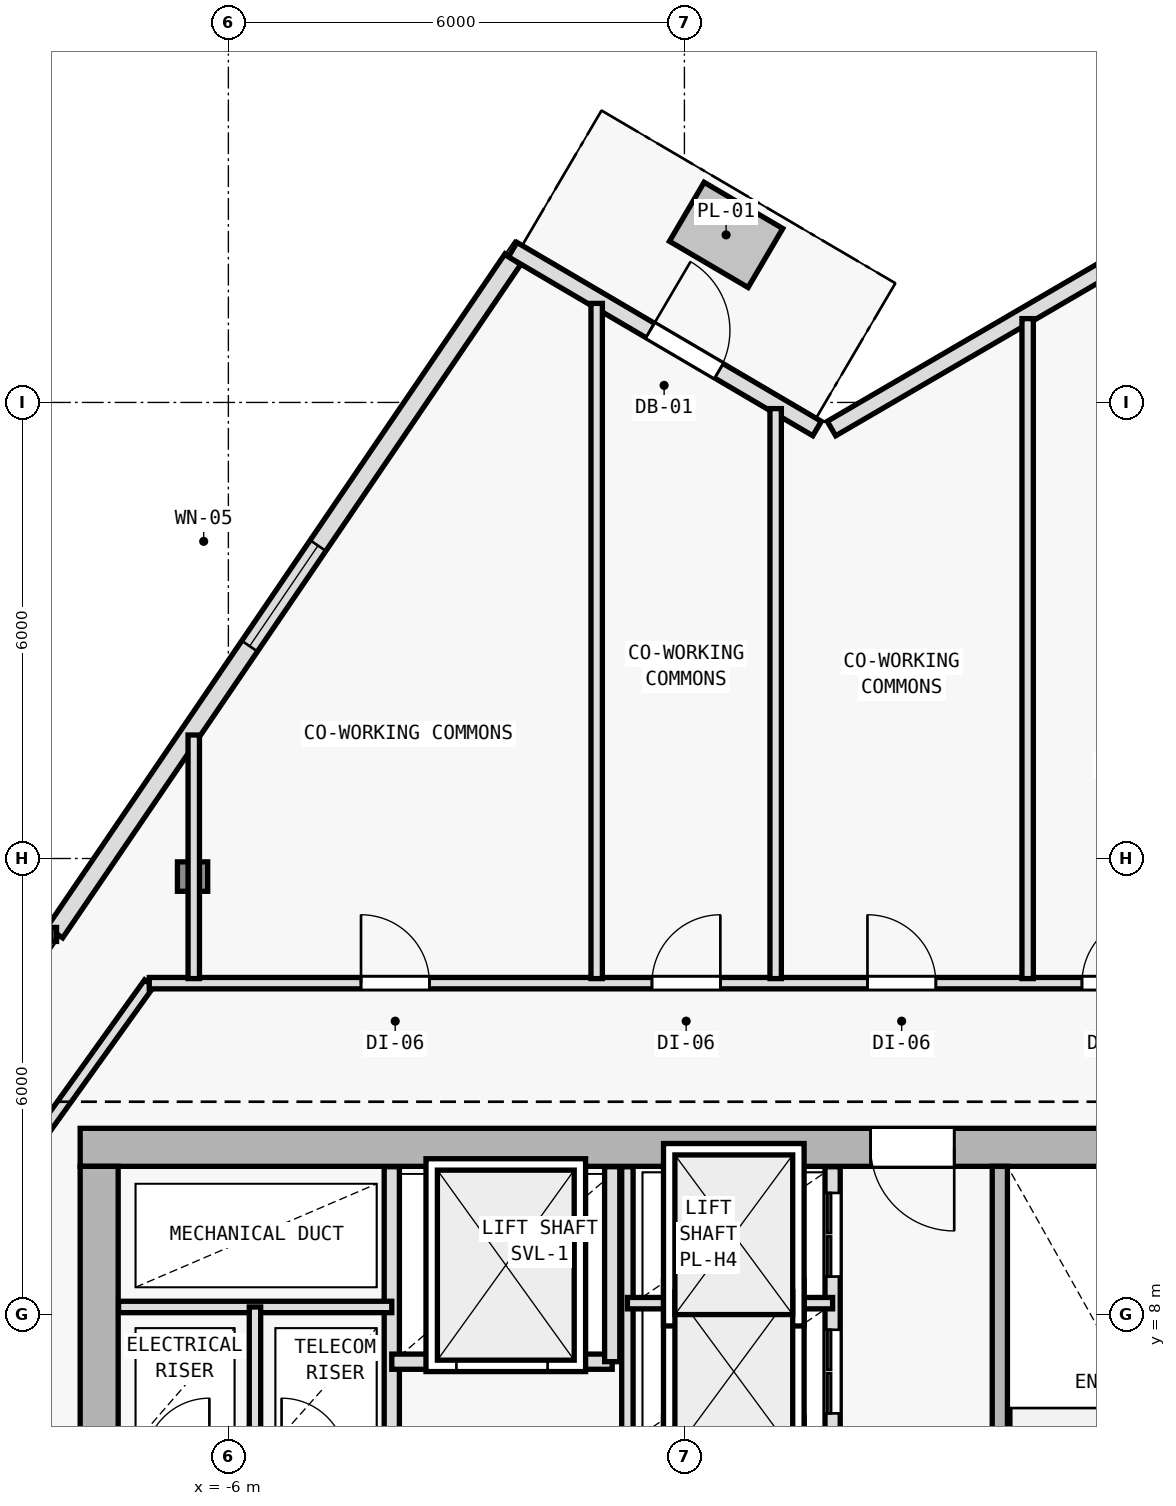
"""IFC4 building model, lengths in metres.
Left out: names, types, materials, properties, quantities, classifications, styles, units other than length and angle.
Written with IfcOpenShell. Run it as: python <this file> out.ifc"""

import sys

from ifc_helpers import new_model, si_unit, direction, frame, frame_2d, origin, origin_2d, place, context, subcontext, project, spatial, rectangle, i_section, extrude, element, fill, save


model = new_model("IFC4")
c1 = context("Model", 3, precision=1e-05, world=origin(), true_north=direction((0.0, 1.0)))
c2 = subcontext(c1, "Body", "Model", "MODEL_VIEW")
j1 = project(units=[si_unit("LENGTHUNIT", "METRE"), si_unit("PLANEANGLEUNIT", "RADIAN")], contexts=[c1])
p1 = place(None, origin())
s1 = spatial("IfcSite", under=j1, at=p1, CompositionType="ELEMENT")
p2 = place(p1, origin())
s2 = spatial("IfcBuilding", under=s1, at=p2, CompositionType="ELEMENT")
p3 = place(p2, frame((0.0, 0.0, 205.5)))
s3 = spatial("IfcBuildingStorey", under=s2, at=p3, CompositionType="ELEMENT", Elevation=205.5)
p4 = place(p3, frame((-7.7, 10.2, 0.0), z_axis=(0.0, 0.0, 1.0), x_axis=(1.0, 0.0, 0.0)))
e1 = element("IfcColumn", 1, at=p4, inside=s3, PredefinedType="COLUMN", context=c2, shape_type="SweptSolid", body=[
    extrude(i_section(OverallWidth=0.398, OverallDepth=0.387, WebThickness=0.013, FlangeThickness=0.022, FilletRadius=0.015, at=origin_2d()), origin(), (0.0, 0.0, 1.0), 3.6),
])
p5 = place(p3, frame((-6.471, 13.762, 0.006), z_axis=(0.008775143007, -0.002584925847, 0.999958156636), x_axis=(0.282568886397, 0.959247009086, 0.0)))
e2 = element("IfcColumn", 2, at=p5, inside=s3, PredefinedType="COLUMN", context=c2, shape_type="SweptSolid", body=[
    extrude(i_section(OverallWidth=0.398, OverallDepth=0.387, WebThickness=0.013, FlangeThickness=0.022, FilletRadius=0.015, at=origin_2d()), origin(), (0.0, 0.0, 1.0), 3.589),
])
p6 = place(p3, frame((-8.284, 13.026, 0.0), z_axis=(0.0, 0.0, 1.0), x_axis=(0.562468945091, 0.826818411629, 0.0)))
e3 = element("IfcWall", 3, at=p6, inside=s3, PredefinedType="SOLIDWALL", context=c2, shape_type="SweptSolid", body=[
    extrude(rectangle(XDim=10.714, YDim=0.25, at=frame_2d((5.357, 0.0))), origin(), (0.0, 0.0, 1.0), 3.35),
])
p7 = place(p6, frame((4.557, 0.0, 0.62)))
e4 = element("IfcOpeningElement", 4, at=p7, cuts=e3, PredefinedType="OPENING", context=c2, shape_type="SweptSolid", body=[
    extrude(rectangle(XDim=1.6, YDim=2.1, at=frame_2d((0.8, 1.05))), frame((0.0, 0.135, 0.0), z_axis=(0.0, -1.0, 0.0), x_axis=(1.0, 0.0, 0.0)), (0.0, 0.0, 1.0), 0.27),
])
p8 = place(p3, frame((1.935, 19.656, 0.0), z_axis=(0.0, 0.0, 1.0), x_axis=(0.863987356641, 0.503513502862, 0.0)))
e5 = element("IfcWall", 5, at=p8, inside=s3, PredefinedType="SOLIDWALL", context=c2, shape_type="SweptSolid", body=[
    extrude(rectangle(XDim=4.204, YDim=0.22, at=frame_2d((2.102, 0.0))), origin(), (0.0, 0.0, 1.0), 3.35),
])
p9 = place(p3, frame((-2.259, 22.01, 0.0), z_axis=(0.0, 0.0, 1.0), x_axis=(0.862123324624, -0.506698503193, 0.0)))
e6 = element("IfcWall", 6, at=p9, inside=s3, PredefinedType="SOLIDWALL", context=c2, shape_type="SweptSolid", body=[
    extrude(rectangle(XDim=4.645, YDim=0.22, at=frame_2d((2.322, 0.0))), origin(), (0.0, 0.0, 1.0), 3.35),
])
p10 = place(p9, frame((2.097, 0.0, 0.0)))
e7 = element("IfcOpeningElement", 7, at=p10, cuts=e6, PredefinedType="OPENING", context=c2, shape_type="SweptSolid", body=[
    extrude(rectangle(XDim=1.05, YDim=2.15, at=frame_2d((0.525, 1.075))), frame((0.0, 0.12, 0.0), z_axis=(0.0, -1.0, 0.0), x_axis=(1.0, 0.0, 0.0)), (0.0, 0.0, 1.0), 0.24),
])
p11 = place(p3, frame((7.95, 10.2, 0.0), z_axis=(0.0, 0.0, 1.0), x_axis=(-1.0, 0.0, 0.0)))
e8 = element("IfcWall", 8, at=p11, inside=s3, PredefinedType="SHEAR", context=c2, shape_type="SweptSolid", body=[
    extrude(rectangle(XDim=15.9, YDim=0.5, at=frame_2d((7.95, 0.0))), origin(), (0.0, 0.0, 1.0), 3.35),
])
p12 = place(p11, frame((4.4, 0.0, 0.0)))
e9 = element("IfcOpeningElement", 9, at=p12, cuts=e8, PredefinedType="OPENING", context=c2, shape_type="SweptSolid", body=[
    extrude(rectangle(XDim=1.1, YDim=2.15, at=frame_2d((0.55, 1.075))), frame((0.0, 0.26, 0.0), z_axis=(0.0, -1.0, 0.0), x_axis=(1.0, 0.0, 0.0)), (0.0, 0.0, 1.0), 0.52),
])
p13 = place(p3, frame((-7.7, -9.15, 0.0), z_axis=(0.0, 0.0, 1.0), x_axis=(0.0, 1.0, 0.0)))
e10 = element("IfcWall", 10, at=p13, inside=s3, PredefinedType="SHEAR", context=c2, shape_type="SweptSolid", body=[
    extrude(rectangle(XDim=19.1, YDim=0.5, at=frame_2d((9.55, 0.0))), origin(), (0.0, 0.0, 1.0), 3.35),
])
p14 = place(p13, frame((12.7, 0.0, 0.0)))
e11 = element("IfcOpeningElement", 11, at=p14, cuts=e10, PredefinedType="OPENING", context=c2, shape_type="SweptSolid", body=[
    extrude(rectangle(XDim=1.1, YDim=2.15, at=frame_2d((0.55, 1.075))), frame((0.0, 0.26, 0.0), z_axis=(0.0, -1.0, 0.0), x_axis=(1.0, 0.0, 0.0)), (0.0, 0.0, 1.0), 0.52),
])
p15 = place(p3, frame((-3.85, 1.35, 0.0), z_axis=(0.0, 0.0, 1.0), x_axis=(0.0, 1.0, 0.0)))
e12 = element("IfcWall", 12, at=p15, inside=s3, PredefinedType="SOLIDWALL", context=c2, shape_type="SweptSolid", body=[
    extrude(rectangle(XDim=8.595, YDim=0.2, at=frame_2d((4.297, 0.0))), origin(), (0.0, 0.0, 1.0), 3.35),
])
p16 = place(p15, frame((1.5, 0.0, 0.0)))
e13 = element("IfcOpeningElement", 13, at=p16, cuts=e12, PredefinedType="OPENING", context=c2, shape_type="SweptSolid", body=[
    extrude(rectangle(XDim=1.0, YDim=2.15, at=frame_2d((0.5, 1.075))), frame((0.0, 0.11, 0.0), z_axis=(0.0, -1.0, 0.0), x_axis=(1.0, 0.0, 0.0)), (0.0, 0.0, 1.0), 0.22),
])
p17 = place(p15, frame((3.18, 0.0, 0.0)))
e14 = element("IfcOpeningElement", 14, at=p17, cuts=e12, PredefinedType="OPENING", context=c2, shape_type="SweptSolid", body=[
    extrude(rectangle(XDim=1.0, YDim=2.15, at=frame_2d((0.5, 1.075))), frame((0.0, 0.11, 0.0), z_axis=(0.0, -1.0, 0.0), x_axis=(1.0, 0.0, 0.0)), (0.0, 0.0, 1.0), 0.22),
])
p18 = place(p3, frame((-7.445, 8.1, 0.0), z_axis=(0.0, 0.0, 1.0), x_axis=(1.0, 0.0, 0.0)))
e15 = element("IfcWall", 15, at=p18, inside=s3, PredefinedType="PARTITIONING", context=c2, shape_type="SweptSolid", body=[
    extrude(rectangle(XDim=3.595, YDim=0.15, at=frame_2d((1.797, 0.0))), origin(), (0.0, 0.0, 1.0), 3.35),
])
p19 = place(p3, frame((-5.65, 6.05, 0.0), z_axis=(0.0, 0.0, 1.0), x_axis=(0.0, 1.0, 0.0)))
e16 = element("IfcWall", 16, at=p19, inside=s3, PredefinedType="PARTITIONING", context=c2, shape_type="SweptSolid", body=[
    extrude(rectangle(XDim=2.05, YDim=0.15, at=frame_2d((1.025, 0.0))), origin(), (0.0, 0.0, 1.0), 3.35),
])
p20 = place(p3, frame((4.15, 2.75, 0.0), z_axis=(0.0, 0.0, 1.0), x_axis=(0.0, 1.0, 0.0)))
e17 = element("IfcWall", 17, at=p20, inside=s3, PredefinedType="SOLIDWALL", context=c2, shape_type="SweptSolid", body=[
    extrude(rectangle(XDim=7.2, YDim=0.2, at=frame_2d((3.6, 0.0))), origin(), (0.0, 0.0, 1.0), 3.35),
])
p21 = place(p20, frame((0.35, 0.0, 0.0)))
e18 = element("IfcOpeningElement", 18, at=p21, cuts=e17, PredefinedType="OPENING", context=c2, shape_type="SweptSolid", body=[
    extrude(rectangle(XDim=1.0, YDim=2.15, at=frame_2d((0.5, 1.075))), frame((0.0, 0.11, 0.0), z_axis=(0.0, -1.0, 0.0), x_axis=(1.0, 0.0, 0.0)), (0.0, 0.0, 1.0), 0.22),
])
p22 = place(p3, frame((-3.85, 7.38, 0.0), z_axis=(0.0, 0.0, 1.0), x_axis=(1.0, 0.0, 0.0)))
e19 = element("IfcWall", 19, at=p22, inside=s3, PredefinedType="SOLIDWALL", context=c2, shape_type="SweptSolid", body=[
    extrude(rectangle(XDim=2.9, YDim=0.2, at=frame_2d((1.45, 0.0))), origin(), (0.0, 0.0, 1.0), 3.35),
])
p23 = place(p22, frame((0.85, 0.0, 0.0)))
e20 = element("IfcOpeningElement", 20, at=p23, cuts=e19, PredefinedType="OPENING", context=c2, shape_type="SweptSolid", body=[
    extrude(rectangle(XDim=1.2, YDim=2.2, at=frame_2d((0.6, 1.1))), frame((0.0, 0.11, 0.0), z_axis=(0.0, -1.0, 0.0), x_axis=(1.0, 0.0, 0.0)), (0.0, 0.0, 1.0), 0.22),
])
p24 = place(p3, frame((-0.95, 7.38, 0.0), z_axis=(0.0, 0.0, 1.0), x_axis=(0.0, 1.0, 0.0)))
e21 = element("IfcWall", 21, at=p24, inside=s3, PredefinedType="SOLIDWALL", context=c2, shape_type="SweptSolid", body=[
    extrude(rectangle(XDim=2.565, YDim=0.2, at=frame_2d((1.283, 0.0))), origin(), (0.0, 0.0, 1.0), 3.35),
])
p25 = place(p3, frame((1.95, 2.65, 0.0), z_axis=(0.0, 0.0, 1.0), x_axis=(0.0, 1.0, 0.0)))
e22 = element("IfcWall", 22, at=p25, inside=s3, PredefinedType="SOLIDWALL", context=c2, shape_type="SweptSolid", body=[
    extrude(rectangle(XDim=7.295, YDim=0.2, at=frame_2d((3.647, 0.0))), origin(), (0.0, 0.0, 1.0), 3.35),
])
p26 = place(p25, frame((0.45, 0.0, 0.0)))
e23 = element("IfcOpeningElement", 23, at=p26, cuts=e22, PredefinedType="OPENING", context=c2, shape_type="SweptSolid", body=[
    extrude(rectangle(XDim=1.1, YDim=2.15, at=frame_2d((0.55, 1.075))), frame((0.0, 0.11, 0.0), z_axis=(0.0, -1.0, 0.0), x_axis=(1.0, 0.0, 0.0)), (0.0, 0.0, 1.0), 0.22),
])
p27 = place(p25, frame((2.25, 0.0, 0.0)))
e24 = element("IfcOpeningElement", 24, at=p27, cuts=e22, PredefinedType="OPENING", context=c2, shape_type="SweptSolid", body=[
    extrude(rectangle(XDim=1.1, YDim=2.15, at=frame_2d((0.55, 1.075))), frame((0.0, 0.11, 0.0), z_axis=(0.0, -1.0, 0.0), x_axis=(1.0, 0.0, 0.0)), (0.0, 0.0, 1.0), 0.22),
])
p28 = place(p25, frame((4.05, 0.0, 0.0)))
e25 = element("IfcOpeningElement", 25, at=p28, cuts=e22, PredefinedType="OPENING", context=c2, shape_type="SweptSolid", body=[
    extrude(rectangle(XDim=1.1, YDim=2.15, at=frame_2d((0.55, 1.075))), frame((0.0, 0.11, 0.0), z_axis=(0.0, -1.0, 0.0), x_axis=(1.0, 0.0, 0.0)), (0.0, 0.0, 1.0), 0.22),
])
p29 = place(p25, frame((5.85, 0.0, 0.0)))
e26 = element("IfcOpeningElement", 26, at=p29, cuts=e22, PredefinedType="OPENING", context=c2, shape_type="SweptSolid", body=[
    extrude(rectangle(XDim=1.1, YDim=2.15, at=frame_2d((0.55, 1.075))), frame((0.0, 0.11, 0.0), z_axis=(0.0, -1.0, 0.0), x_axis=(1.0, 0.0, 0.0)), (0.0, 0.0, 1.0), 0.22),
])
p30 = place(p3, frame((-0.75, 5.92, 0.0), z_axis=(0.0, 0.0, 1.0), x_axis=(0.0, 1.0, 0.0)))
e27 = element("IfcWall", 27, at=p30, inside=s3, PredefinedType="PARTITIONING", context=c2, shape_type="SweptSolid", body=[
    extrude(rectangle(XDim=4.025, YDim=0.15, at=frame_2d((2.013, 0.0))), origin(), (0.0, 0.0, 1.0), 3.35),
])
p31 = place(p3, frame((-0.75, 8.15, 0.0), z_axis=(0.0, 0.0, 1.0), x_axis=(1.0, 0.0, 0.0)))
e28 = element("IfcWall", 28, at=p31, inside=s3, PredefinedType="PARTITIONING", context=c2, shape_type="SweptSolid", body=[
    extrude(rectangle(XDim=2.7, YDim=0.15, at=frame_2d((1.35, 0.0))), origin(), (0.0, 0.0, 1.0), 3.35),
])
p32 = place(p3, frame((-9.86, 8.426, 0.0), z_axis=(0.0, 0.0, 1.0), x_axis=(0.582449511476, 0.812866881218, 0.0)))
e29 = element("IfcWall", 29, at=p32, inside=s3, PredefinedType="PARTITIONING", context=c2, shape_type="SweptSolid", body=[
    extrude(rectangle(XDim=4.84, YDim=0.15, at=frame_2d((2.42, 0.0))), origin(), (0.0, 0.0, 1.0), 2.975),
])
p33 = place(p3, frame((-7.041, 12.36, 0.0), z_axis=(0.0, 0.0, 1.0), x_axis=(1.0, 0.0, 0.0)))
e30 = element("IfcWall", 30, at=p33, inside=s3, PredefinedType="PARTITIONING", context=c2, shape_type="SweptSolid", body=[
    extrude(rectangle(XDim=14.064, YDim=0.15, at=frame_2d((7.032, 0.0))), origin(), (0.0, 0.0, 1.0), 2.975),
])
p34 = place(p33, frame((12.272, 0.0, 0.0)))
e31 = element("IfcOpeningElement", 31, at=p34, cuts=e30, PredefinedType="OPENING", context=c2, shape_type="SweptSolid", body=[
    extrude(rectangle(XDim=0.9, YDim=2.1, at=frame_2d((0.45, 1.05))), frame((0.0, 0.085, 0.0), z_axis=(0.0, -1.0, 0.0), x_axis=(1.0, 0.0, 0.0)), (0.0, 0.0, 1.0), 0.17),
])
p35 = place(p33, frame((9.449, 0.0, 0.0)))
e32 = element("IfcOpeningElement", 32, at=p35, cuts=e30, PredefinedType="OPENING", context=c2, shape_type="SweptSolid", body=[
    extrude(rectangle(XDim=0.9, YDim=2.1, at=frame_2d((0.45, 1.05))), frame((0.0, 0.085, 0.0), z_axis=(0.0, -1.0, 0.0), x_axis=(1.0, 0.0, 0.0)), (0.0, 0.0, 1.0), 0.17),
])
p36 = place(p33, frame((6.614, 0.0, 0.0)))
e33 = element("IfcOpeningElement", 33, at=p36, cuts=e30, PredefinedType="OPENING", context=c2, shape_type="SweptSolid", body=[
    extrude(rectangle(XDim=0.9, YDim=2.1, at=frame_2d((0.45, 1.05))), frame((0.0, 0.085, 0.0), z_axis=(0.0, -1.0, 0.0), x_axis=(1.0, 0.0, 0.0)), (0.0, 0.0, 1.0), 0.17),
])
p37 = place(p33, frame((2.786, 0.0, 0.0)))
e34 = element("IfcOpeningElement", 34, at=p37, cuts=e30, PredefinedType="OPENING", context=c2, shape_type="SweptSolid", body=[
    extrude(rectangle(XDim=0.9, YDim=2.1, at=frame_2d((0.45, 1.05))), frame((0.0, 0.085, 0.0), z_axis=(0.0, -1.0, 0.0), x_axis=(1.0, 0.0, 0.0)), (0.0, 0.0, 1.0), 0.17),
])
p38 = place(p3, frame((-6.456, 12.42, 0.0), z_axis=(0.0, 0.0, 1.0), x_axis=(0.0, 1.0, 0.0)))
e35 = element("IfcWall", 35, at=p38, inside=s3, PredefinedType="PARTITIONING", context=c2, shape_type="SweptSolid", body=[
    extrude(rectangle(XDim=3.205, YDim=0.15, at=frame_2d((1.602, 0.0))), origin(), (0.0, 0.0, 1.0), 2.975),
])
p39 = place(p3, frame((1.2, 12.42, 0.0), z_axis=(0.0, 0.0, 1.0), x_axis=(0.0, 1.0, 0.0)))
e36 = element("IfcWall", 36, at=p39, inside=s3, PredefinedType="PARTITIONING", context=c2, shape_type="SweptSolid", body=[
    extrude(rectangle(XDim=7.499, YDim=0.15, at=frame_2d((3.75, 0.0))), origin(), (0.0, 0.0, 1.0), 2.975),
])
p40 = place(p3, frame((4.516, 12.42, 0.0), z_axis=(0.0, 0.0, 1.0), x_axis=(0.0, 1.0, 0.0)))
e37 = element("IfcWall", 37, at=p40, inside=s3, PredefinedType="PARTITIONING", context=c2, shape_type="SweptSolid", body=[
    extrude(rectangle(XDim=8.683, YDim=0.15, at=frame_2d((4.341, 0.0))), origin(), (0.0, 0.0, 1.0), 2.975),
])
p41 = place(p3, frame((-1.154, 12.42, 0.0), z_axis=(0.0, 0.0, 1.0), x_axis=(0.0, 1.0, 0.0)))
e38 = element("IfcWall", 38, at=p41, inside=s3, PredefinedType="PARTITIONING", context=c2, shape_type="SweptSolid", body=[
    extrude(rectangle(XDim=8.883, YDim=0.15, at=frame_2d((4.441, 0.0))), origin(), (0.0, 0.0, 1.0), 2.975),
])
p42 = place(p7, origin())
e39 = element("IfcWindow", 39, at=p42, inside=s3, PartitioningType="SINGLE_PANEL", PredefinedType="WINDOW", context=c2, shape_type="SweptSolid", body=[
    extrude(rectangle(XDim=1.6, YDim=2.1, at=frame_2d((0.8, 1.05))), frame((0.0, 0.03, 0.0), z_axis=(0.0, -1.0, 0.0), x_axis=(1.0, 0.0, 0.0)), (0.0, 0.0, 1.0), 0.06),
])
fill(e4, e39)
p43 = place(p10, origin())
e40 = element("IfcDoor", 40, at=p43, inside=s3, OperationType="SINGLE_SWING_LEFT", PredefinedType="DOOR", context=c2, shape_type="SweptSolid", body=[
    extrude(rectangle(XDim=1.05, YDim=2.15, at=frame_2d((0.525, 1.075))), frame((0.0, 0.025, 0.0), z_axis=(0.0, -1.0, 0.0), x_axis=(1.0, 0.0, 0.0)), (0.0, 0.0, 1.0), 0.05),
])
fill(e7, e40)
p44 = place(p12, origin())
e41 = element("IfcDoor", 41, at=p44, inside=s3, OperationType="SINGLE_SWING_LEFT", PredefinedType="DOOR", context=c2, shape_type="SweptSolid", body=[
    extrude(rectangle(XDim=1.1, YDim=2.15, at=frame_2d((0.55, 1.075))), frame((0.0, 0.025, 0.0), z_axis=(0.0, -1.0, 0.0), x_axis=(1.0, 0.0, 0.0)), (0.0, 0.0, 1.0), 0.05),
])
fill(e9, e41)
p45 = place(p23, origin())
e42 = element("IfcDoor", 42, at=p45, inside=s3, OperationType="DOUBLE_DOOR_SLIDING", PredefinedType="DOOR", context=c2, shape_type="SweptSolid", body=[
    extrude(rectangle(XDim=1.2, YDim=2.2, at=frame_2d((0.6, 1.1))), frame((0.0, 0.025, 0.0), z_axis=(0.0, -1.0, 0.0), x_axis=(1.0, 0.0, 0.0)), (0.0, 0.0, 1.0), 0.05),
])
fill(e20, e42)
p46 = place(p28, origin())
e43 = element("IfcDoor", 43, at=p46, inside=s3, OperationType="DOUBLE_DOOR_SLIDING", PredefinedType="DOOR", context=c2, shape_type="SweptSolid", body=[
    extrude(rectangle(XDim=1.1, YDim=2.15, at=frame_2d((0.55, 1.075))), frame((0.0, 0.025, 0.0), z_axis=(0.0, -1.0, 0.0), x_axis=(1.0, 0.0, 0.0)), (0.0, 0.0, 1.0), 0.05),
])
fill(e25, e43)
p47 = place(p29, origin())
e44 = element("IfcDoor", 44, at=p47, inside=s3, OperationType="DOUBLE_DOOR_SLIDING", PredefinedType="DOOR", context=c2, shape_type="SweptSolid", body=[
    extrude(rectangle(XDim=1.1, YDim=2.15, at=frame_2d((0.55, 1.075))), frame((0.0, 0.025, 0.0), z_axis=(0.0, -1.0, 0.0), x_axis=(1.0, 0.0, 0.0)), (0.0, 0.0, 1.0), 0.05),
])
fill(e26, e44)
p48 = place(p34, origin())
e45 = element("IfcDoor", 45, at=p48, inside=s3, OperationType="SINGLE_SWING_RIGHT", PredefinedType="DOOR", context=c2, shape_type="SweptSolid", body=[
    extrude(rectangle(XDim=0.9, YDim=2.1, at=frame_2d((0.45, 1.05))), frame((0.0, 0.025, 0.0), z_axis=(0.0, -1.0, 0.0), x_axis=(1.0, 0.0, 0.0)), (0.0, 0.0, 1.0), 0.05),
])
fill(e31, e45)
p49 = place(p35, origin())
e46 = element("IfcDoor", 46, at=p49, inside=s3, OperationType="SINGLE_SWING_LEFT", PredefinedType="DOOR", context=c2, shape_type="SweptSolid", body=[
    extrude(rectangle(XDim=0.9, YDim=2.1, at=frame_2d((0.45, 1.05))), frame((0.0, 0.025, 0.0), z_axis=(0.0, -1.0, 0.0), x_axis=(1.0, 0.0, 0.0)), (0.0, 0.0, 1.0), 0.05),
])
fill(e32, e46)
p50 = place(p36, origin())
e47 = element("IfcDoor", 47, at=p50, inside=s3, OperationType="SINGLE_SWING_RIGHT", PredefinedType="DOOR", context=c2, shape_type="SweptSolid", body=[
    extrude(rectangle(XDim=0.9, YDim=2.1, at=frame_2d((0.45, 1.05))), frame((0.0, 0.025, 0.0), z_axis=(0.0, -1.0, 0.0), x_axis=(1.0, 0.0, 0.0)), (0.0, 0.0, 1.0), 0.05),
])
fill(e33, e47)
p51 = place(p37, origin())
e48 = element("IfcDoor", 48, at=p51, inside=s3, OperationType="SINGLE_SWING_LEFT", PredefinedType="DOOR", context=c2, shape_type="SweptSolid", body=[
    extrude(rectangle(XDim=0.9, YDim=2.1, at=frame_2d((0.45, 1.05))), frame((0.0, 0.025, 0.0), z_axis=(0.0, -1.0, 0.0), x_axis=(1.0, 0.0, 0.0)), (0.0, 0.0, 1.0), 0.05),
])
fill(e34, e48)
save(model, sys.argv[1])
